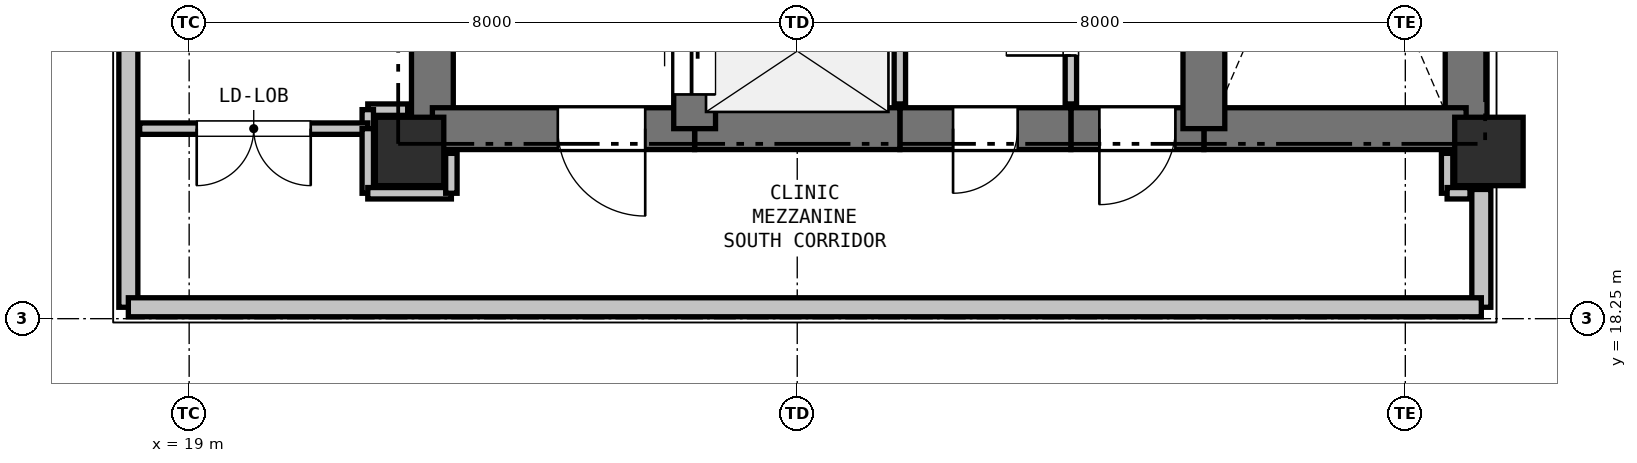
"""IFC4 building model, lengths in metres.
Left out: names, types, materials, properties, quantities, classifications, styles, units other than length and angle.
Written with IfcOpenShell. Run it as: python <this file> out.ifc"""

import sys

from ifc_helpers import new_model, si_unit, direction, frame, frame_2d, origin, origin_2d, place, context, subcontext, project, spatial, rectangle, extrude, element, fill, save


model = new_model("IFC4")
c1 = context("Model", 3, precision=1e-05, world=origin(), true_north=direction((0.0, 1.0)))
c2 = subcontext(c1, "Body", "Model", "MODEL_VIEW")
j1 = project(units=[si_unit("LENGTHUNIT", "METRE"), si_unit("PLANEANGLEUNIT", "RADIAN")], contexts=[c1])
p1 = place(None, origin())
s1 = spatial("IfcSite", under=j1, at=p1, CompositionType="ELEMENT")
p2 = place(p1, origin())
s2 = spatial("IfcBuilding", under=s1, at=p2, CompositionType="ELEMENT")
p3 = place(p2, frame((0.0, 0.0, 5.1)))
s3 = spatial("IfcBuildingStorey", under=s2, at=p3, CompositionType="ELEMENT", Elevation=5.1)
for number, where, z_axis, x_axis in (
    (1, (21.9, 20.45, 0.0), (0.0, 0.0, 1.0), (1.0, 0.0, 0.0)),
    (2, (36.1, 20.45, 0.0), (0.0, 0.0, 1.0), (1.0, 0.0, 0.0)),
):
    element("IfcColumn", number, at=place(p3, frame(where, z_axis=z_axis, x_axis=x_axis)), inside=s3, PredefinedType="COLUMN", context=c2, shape_type="SweptSolid", body=[
        extrude(rectangle(XDim=0.9, YDim=0.9, at=origin_2d()), origin(), (0.0, 0.0, 1.0), 4.5),
    ])
p4 = place(p3, frame((18.2, 18.4, 0.0), z_axis=(0.0, 0.0, 1.0), x_axis=(0.0, 1.0, 0.0)))
e3 = element("IfcWall", 3, at=p4, inside=s3, PredefinedType="SOLIDWALL", context=c2, shape_type="SweptSolid", body=[
    extrude(rectangle(XDim=16.7, YDim=0.25, at=frame_2d((8.35, 0.0))), origin(), (0.0, 0.0, 1.0), 2.565),
])
p5 = place(p3, frame((36.0, 19.95, 0.0), z_axis=(0.0, 0.0, 1.0), x_axis=(0.0, -1.0, 0.0)))
e4 = element("IfcWall", 4, at=p5, inside=s3, PredefinedType="SOLIDWALL", context=c2, shape_type="SweptSolid", body=[
    extrude(rectangle(XDim=1.55, YDim=0.25, at=frame_2d((0.775, 0.0))), origin(), (0.0, 0.0, 1.0), 2.815),
])
p6 = place(p3, frame((36.0, 18.4, 0.0), z_axis=(0.0, 0.0, 1.0), x_axis=(-1.0, 0.0, 0.0)))
e5 = element("IfcWall", 5, at=p6, inside=s3, PredefinedType="SOLIDWALL", context=c2, shape_type="SweptSolid", body=[
    extrude(rectangle(XDim=17.8, YDim=0.25, at=frame_2d((8.9, 0.0))), origin(), (0.0, 0.0, 1.0), 2.565),
])
p7 = place(p3, frame((22.2, 20.75, 0.0), z_axis=(0.0, 0.0, 1.0), x_axis=(0.0, 1.0, 0.0)))
e6 = element("IfcWall", 6, at=p7, inside=s3, PredefinedType="SHEAR", context=c2, shape_type="SweptSolid", body=[
    extrude(rectangle(XDim=4.65, YDim=0.55, at=frame_2d((2.325, 0.0))), origin(), (0.0, 0.0, 1.0), 4.18),
])
p8 = place(p3, frame((35.8, 28.1, 0.0), z_axis=(0.0, 0.0, 1.0), x_axis=(0.0, -1.0, 0.0)))
e7 = element("IfcWall", 7, at=p8, inside=s3, PredefinedType="SHEAR", context=c2, shape_type="SweptSolid", body=[
    extrude(rectangle(XDim=7.35, YDim=0.55, at=frame_2d((3.675, 0.0))), origin(), (0.0, 0.0, 1.0), 4.18),
])
p9 = place(p3, frame((35.8, 20.75, 0.0), z_axis=(0.0, 0.0, 1.0), x_axis=(-1.0, 0.0, 0.0)))
e8 = element("IfcWall", 8, at=p9, inside=s3, PredefinedType="SHEAR", context=c2, shape_type="SweptSolid", body=[
    extrude(rectangle(XDim=3.45, YDim=0.55, at=frame_2d((1.725, 0.0))), origin(), (0.0, 0.0, 1.0), 4.18),
])
p10 = place(p3, frame((32.35, 20.75, 0.0), z_axis=(0.0, 0.0, 1.0), x_axis=(-1.0, 0.0, 0.0)))
e9 = element("IfcWall", 9, at=p10, inside=s3, PredefinedType="SHEAR", context=c2, shape_type="SweptSolid", body=[
    extrude(rectangle(XDim=1.75, YDim=0.55, at=frame_2d((0.875, 0.0))), origin(), (0.0, 0.0, 1.0), 4.18),
])
p11 = place(p10, frame((0.375, 0.0, 0.0)))
e10 = element("IfcOpeningElement", 10, at=p11, cuts=e9, PredefinedType="OPENING", context=c2, shape_type="SweptSolid", body=[
    extrude(rectangle(XDim=1.0, YDim=2.15, at=frame_2d((0.5, 1.075))), frame((0.0, 0.285, 0.0), z_axis=(0.0, -1.0, 0.0), x_axis=(1.0, 0.0, 0.0)), (0.0, 0.0, 1.0), 0.57),
])
p12 = place(p3, frame((30.6, 20.75, 0.0), z_axis=(0.0, 0.0, 1.0), x_axis=(-1.0, 0.0, 0.0)))
e11 = element("IfcWall", 11, at=p12, inside=s3, PredefinedType="SHEAR", context=c2, shape_type="SweptSolid", body=[
    extrude(rectangle(XDim=2.25, YDim=0.55, at=frame_2d((1.125, 0.0))), origin(), (0.0, 0.0, 1.0), 4.18),
])
p13 = place(p12, frame((0.7, 0.0, 0.0)))
e12 = element("IfcOpeningElement", 12, at=p13, cuts=e11, PredefinedType="OPENING", context=c2, shape_type="SweptSolid", body=[
    extrude(rectangle(XDim=0.85, YDim=2.1, at=frame_2d((0.425, 1.05))), frame((0.0, 0.285, 0.0), z_axis=(0.0, -1.0, 0.0), x_axis=(1.0, 0.0, 0.0)), (0.0, 0.0, 1.0), 0.57),
])
p14 = place(p3, frame((28.35, 20.75, 0.0), z_axis=(0.0, 0.0, 1.0), x_axis=(-1.0, 0.0, 0.0)))
e13 = element("IfcWall", 13, at=p14, inside=s3, PredefinedType="SHEAR", context=c2, shape_type="SweptSolid", body=[
    extrude(rectangle(XDim=2.7, YDim=0.55, at=frame_2d((1.35, 0.0))), origin(), (0.0, 0.0, 1.0), 4.18),
])
p15 = place(p3, frame((25.65, 20.75, 0.0), z_axis=(0.0, 0.0, 1.0), x_axis=(-1.0, 0.0, 0.0)))
e14 = element("IfcWall", 14, at=p15, inside=s3, PredefinedType="SHEAR", context=c2, shape_type="SweptSolid", body=[
    extrude(rectangle(XDim=3.45, YDim=0.55, at=frame_2d((1.725, 0.0))), origin(), (0.0, 0.0, 1.0), 4.18),
])
p16 = place(p15, frame((0.65, 0.0, 0.0)))
e15 = element("IfcOpeningElement", 15, at=p16, cuts=e14, PredefinedType="OPENING", context=c2, shape_type="SweptSolid", body=[
    extrude(rectangle(XDim=1.15, YDim=2.15, at=frame_2d((0.575, 1.075))), frame((0.0, 0.285, 0.0), z_axis=(0.0, -1.0, 0.0), x_axis=(1.0, 0.0, 0.0)), (0.0, 0.0, 1.0), 0.57),
])
p17 = place(p3, frame((25.65, 20.75, 0.0), z_axis=(0.0, 0.0, 1.0), x_axis=(0.0, 1.0, 0.0)))
e16 = element("IfcWall", 16, at=p17, inside=s3, PredefinedType="SHEAR", context=c2, shape_type="SweptSolid", body=[
    extrude(rectangle(XDim=2.0, YDim=0.55, at=frame_2d((1.0, 0.0))), origin(), (0.0, 0.0, 1.0), 4.18),
])
p18 = place(p17, frame((0.45, 0.0, 0.0)))
e17 = element("IfcOpeningElement", 17, at=p18, cuts=e16, PredefinedType="OPENING", context=c2, shape_type="SweptSolid", body=[
    extrude(rectangle(XDim=1.1, YDim=2.15, at=frame_2d((0.55, 1.075))), frame((0.0, 0.285, 0.0), z_axis=(0.0, -1.0, 0.0), x_axis=(1.0, 0.0, 0.0)), (0.0, 0.0, 1.0), 0.57),
])
p19 = place(p3, frame((32.35, 20.75, 0.0), z_axis=(0.0, 0.0, 1.0), x_axis=(0.0, 1.0, 0.0)))
e18 = element("IfcWall", 18, at=p19, inside=s3, PredefinedType="SHEAR", context=c2, shape_type="SweptSolid", body=[
    extrude(rectangle(XDim=4.8, YDim=0.55, at=frame_2d((2.4, 0.0))), origin(), (0.0, 0.0, 1.0), 4.18),
])
p20 = place(p3, frame((28.35, 23.2, 0.0), z_axis=(0.0, 0.0, 1.0), x_axis=(0.0, -1.0, 0.0)))
e19 = element("IfcWall", 19, at=p20, inside=s3, PredefinedType="PARTITIONING", context=c2, shape_type="SweptSolid", body=[
    extrude(rectangle(XDim=2.125, YDim=0.15, at=frame_2d((1.062, 0.0))), origin(), (0.0, 0.0, 1.0), 4.18),
])
p21 = place(p3, frame((30.6, 21.075, 0.0), z_axis=(0.0, 0.0, 1.0), x_axis=(0.0, 1.0, 0.0)))
e20 = element("IfcWall", 20, at=p21, inside=s3, PredefinedType="PARTITIONING", context=c2, shape_type="SweptSolid", body=[
    extrude(rectangle(XDim=2.125, YDim=0.15, at=frame_2d((1.062, 0.0))), origin(), (0.0, 0.0, 1.0), 4.18),
])
p22 = place(p21, frame((0.637, 0.0, 0.0)))
e21 = element("IfcOpeningElement", 21, at=p22, cuts=e20, PredefinedType="OPENING", context=c2, shape_type="SweptSolid", body=[
    extrude(rectangle(XDim=0.85, YDim=2.1, at=frame_2d((0.425, 1.05))), frame((0.0, 0.085, 0.0), z_axis=(0.0, -1.0, 0.0), x_axis=(1.0, 0.0, 0.0)), (0.0, 0.0, 1.0), 0.17),
])
p23 = place(p3, frame((21.875, 21.0, 0.0), z_axis=(0.0, 0.0, 1.0), x_axis=(-1.0, 0.0, 0.0)))
e22 = element("IfcWall", 22, at=p23, inside=s3, PredefinedType="PARTITIONING", context=c2, shape_type="SweptSolid", body=[
    extrude(rectangle(XDim=0.525, YDim=0.15, at=frame_2d((0.262, 0.0))), origin(), (0.0, 0.0, 1.0), 3.628),
])
p24 = place(p3, frame((21.35, 21.0, 0.0), z_axis=(0.0, 0.0, 1.0), x_axis=(0.0, -1.0, 0.0)))
e23 = element("IfcWall", 23, at=p24, inside=s3, PredefinedType="PARTITIONING", context=c2, shape_type="SweptSolid", body=[
    extrude(rectangle(XDim=0.25, YDim=0.15, at=frame_2d((0.125, 0.0))), origin(), (0.0, 0.0, 1.0), 4.18),
])
p25 = place(p3, frame((21.35, 20.75, 0.0), z_axis=(0.0, 0.0, 1.0), x_axis=(-1.0, 0.0, 0.0)))
e24 = element("IfcWall", 24, at=p25, inside=s3, PredefinedType="PARTITIONING", context=c2, shape_type="SweptSolid", body=[
    extrude(rectangle(XDim=3.001, YDim=0.15, at=frame_2d((1.5, 0.0))), origin(), (0.0, 0.0, 1.0), 4.18),
])
p26 = place(p25, frame((0.75, 0.0, 0.0)))
e25 = element("IfcOpeningElement", 25, at=p26, cuts=e24, PredefinedType="OPENING", context=c2, shape_type="SweptSolid", body=[
    extrude(rectangle(XDim=1.5, YDim=2.2, at=frame_2d((0.75, 1.1))), frame((0.0, 0.085, 0.0), z_axis=(0.0, -1.0, 0.0), x_axis=(1.0, 0.0, 0.0)), (0.0, 0.0, 1.0), 0.17),
])
p27 = place(p3, frame((21.35, 20.75, 0.0), z_axis=(0.0, 0.0, 1.0), x_axis=(0.0, -1.0, 0.0)))
e26 = element("IfcWall", 26, at=p27, inside=s3, PredefinedType="PARTITIONING", context=c2, shape_type="SweptSolid", body=[
    extrude(rectangle(XDim=0.85, YDim=0.15, at=frame_2d((0.425, 0.0))), origin(), (0.0, 0.0, 1.0), 4.18),
])
p28 = place(p3, frame((21.35, 19.9, 0.0), z_axis=(0.0, 0.0, 1.0), x_axis=(1.0, 0.0, 0.0)))
e27 = element("IfcWall", 27, at=p28, inside=s3, PredefinedType="PARTITIONING", context=c2, shape_type="SweptSolid", body=[
    extrude(rectangle(XDim=1.1, YDim=0.15, at=frame_2d((0.55, 0.0))), origin(), (0.0, 0.0, 1.0), 4.18),
])
for number, where, z_axis, x_axis in (
    (28, (22.45, 19.9, 0.0), (0.0, 0.0, 1.0), (0.0, 1.0, 0.0)),
    (29, (35.55, 20.425, 0.0), (0.0, 0.0, 1.0), (0.0, -1.0, 0.0)),
):
    element("IfcWall", number, at=place(p3, frame(where, z_axis=z_axis, x_axis=x_axis)), inside=s3, PredefinedType="PARTITIONING", context=c2, shape_type="SweptSolid", body=[
        extrude(rectangle(XDim=0.525, YDim=0.15, at=frame_2d((0.263, 0.0))), origin(), (0.0, 0.0, 1.0), 3.628),
    ])
p29 = place(p3, frame((35.55, 19.9, 0.0), z_axis=(0.0, 0.0, 1.0), x_axis=(1.0, 0.0, 0.0)))
e30 = element("IfcWall", 30, at=p29, inside=s3, PredefinedType="PARTITIONING", context=c2, shape_type="SweptSolid", body=[
    extrude(rectangle(XDim=0.301, YDim=0.15, at=frame_2d((0.15, 0.0))), origin(), (0.0, 0.0, 1.0), 4.18),
])
p30 = place(p11, origin())
e31 = element("IfcDoor", 31, at=p30, inside=s3, OperationType="SINGLE_SWING_RIGHT", PredefinedType="DOOR", context=c2, shape_type="SweptSolid", body=[
    extrude(rectangle(XDim=1.0, YDim=2.15, at=frame_2d((0.5, 1.075))), frame((0.0, 0.025, 0.0), z_axis=(0.0, -1.0, 0.0), x_axis=(1.0, 0.0, 0.0)), (0.0, 0.0, 1.0), 0.05),
])
fill(e10, e31)
p31 = place(p18, origin())
e32 = element("IfcDoor", 32, at=p31, inside=s3, OperationType="SLIDING_TO_LEFT", PredefinedType="DOOR", context=c2, shape_type="SweptSolid", body=[
    extrude(rectangle(XDim=1.1, YDim=2.15, at=frame_2d((0.55, 1.075))), frame((0.0, 0.025, 0.0), z_axis=(0.0, -1.0, 0.0), x_axis=(1.0, 0.0, 0.0)), (0.0, 0.0, 1.0), 0.05),
])
fill(e17, e32)
p32 = place(p16, origin())
e33 = element("IfcDoor", 33, at=p32, inside=s3, OperationType="SINGLE_SWING_LEFT", PredefinedType="DOOR", context=c2, shape_type="SweptSolid", body=[
    extrude(rectangle(XDim=1.15, YDim=2.15, at=frame_2d((0.575, 1.075))), frame((0.0, 0.025, 0.0), z_axis=(0.0, -1.0, 0.0), x_axis=(1.0, 0.0, 0.0)), (0.0, 0.0, 1.0), 0.05),
])
fill(e15, e33)
p33 = place(p22, origin())
e34 = element("IfcDoor", 34, at=p33, inside=s3, OperationType="SINGLE_SWING_LEFT", PredefinedType="DOOR", context=c2, shape_type="SweptSolid", body=[
    extrude(rectangle(XDim=0.85, YDim=2.1, at=frame_2d((0.425, 1.05))), frame((0.0, 0.025, 0.0), z_axis=(0.0, -1.0, 0.0), x_axis=(1.0, 0.0, 0.0)), (0.0, 0.0, 1.0), 0.05),
])
fill(e21, e34)
p34 = place(p26, origin())
e35 = element("IfcDoor", 35, at=p34, inside=s3, OperationType="DOUBLE_DOOR_SINGLE_SWING", PredefinedType="DOOR", context=c2, shape_type="SweptSolid", body=[
    extrude(rectangle(XDim=1.5, YDim=2.2, at=frame_2d((0.75, 1.1))), frame((0.0, 0.025, 0.0), z_axis=(0.0, -1.0, 0.0), x_axis=(1.0, 0.0, 0.0)), (0.0, 0.0, 1.0), 0.05),
])
fill(e25, e35)
p35 = place(p13, origin())
e36 = element("IfcDoor", 36, at=p35, inside=s3, OperationType="SINGLE_SWING_RIGHT", PredefinedType="DOOR", context=c2, shape_type="SweptSolid", body=[
    extrude(rectangle(XDim=0.85, YDim=2.1, at=frame_2d((0.425, 1.05))), frame((0.0, 0.025, 0.0), z_axis=(0.0, -1.0, 0.0), x_axis=(1.0, 0.0, 0.0)), (0.0, 0.0, 1.0), 0.05),
])
fill(e12, e36)
save(model, sys.argv[1])
